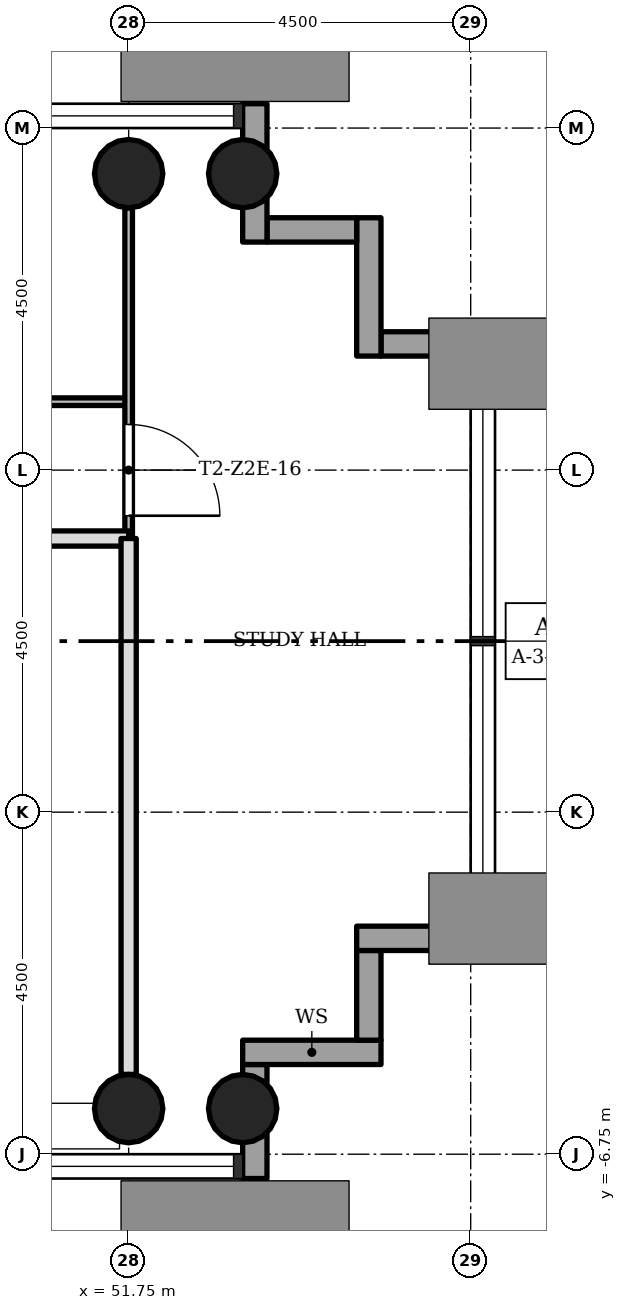
"""IFC4 building model, lengths in metres.
Left out: names, types, materials, properties, quantities, classifications, styles, units other than length and angle.
Written with IfcOpenShell. Run it as: python <this file> out.ifc"""

import sys

from ifc_helpers import new_model, si_unit, direction, frame, frame_2d, origin, origin_2d, place, context, subcontext, project, spatial, rectangle, hollow_circle, extrude, element, fill, save


model = new_model("IFC4")
c1 = context("Model", 3, precision=1e-05, world=origin(), true_north=direction((0.0, 1.0)))
c2 = subcontext(c1, "Body", "Model", "MODEL_VIEW")
j1 = project(units=[si_unit("LENGTHUNIT", "METRE"), si_unit("PLANEANGLEUNIT", "RADIAN")], contexts=[c1])
p1 = place(None, origin())
s1 = spatial("IfcSite", under=j1, at=p1, CompositionType="ELEMENT")
p2 = place(p1, origin())
s2 = spatial("IfcBuilding", under=s1, at=p2, CompositionType="ELEMENT")
p3 = place(p2, frame((0.0, 0.0, 100.4)))
s3 = spatial("IfcBuildingStorey", under=s2, at=p3, CompositionType="ELEMENT", Elevation=100.4)
for number, where, z_axis, x_axis in (
    (1, (51.75, -6.15, 0.0), (0.0, 0.0, 1.0), (1.0, 0.0, 0.0)),
    (2, (51.75, 6.15, 0.0), (0.0, 0.0, 1.0), (1.0, 0.0, 0.0)),
    (3, (53.25, -6.15, 0.0), (0.0, 0.0, 1.0), (1.0, 0.0, 0.0)),
    (4, (53.25, 6.15, 0.0), (0.0, 0.0, 1.0), (1.0, 0.0, 0.0)),
):
    element("IfcColumn", number, at=place(p3, frame(where, z_axis=z_axis, x_axis=x_axis)), inside=s3, PredefinedType="COLUMN", context=c2, shape_type="SweptSolid", body=[
        extrude(hollow_circle(Radius=0.45, WallThickness=0.032, at=origin_2d()), origin(), (0.0, 0.0, 1.0), 3.4),
    ])
p4 = place(p3, frame((53.41, -7.07, -0.3), z_axis=(0.0, 0.0, 1.0), x_axis=(0.0, 1.0, 0.0)))
e5 = element("IfcWall", 5, at=p4, inside=s3, PredefinedType="STANDARD", context=c2, shape_type="SweptSolid", body=[
    extrude(rectangle(XDim=1.5, YDim=0.32, at=frame_2d((0.75, 0.0))), origin(), (0.0, 0.0, 1.0), 3.4),
])
p5 = place(p3, frame((53.25, -5.41, -0.3), z_axis=(0.0, 0.0, 1.0), x_axis=(1.0, 0.0, 0.0)))
e6 = element("IfcWall", 6, at=p5, inside=s3, PredefinedType="STANDARD", context=c2, shape_type="SweptSolid", body=[
    extrude(rectangle(XDim=1.82, YDim=0.32, at=frame_2d((0.91, 0.0))), origin(), (0.0, 0.0, 1.0), 3.4),
])
p6 = place(p3, frame((54.91, -5.25, -0.3), z_axis=(0.0, 0.0, 1.0), x_axis=(0.0, 1.0, 0.0)))
e7 = element("IfcWall", 7, at=p6, inside=s3, PredefinedType="STANDARD", context=c2, shape_type="SweptSolid", body=[
    extrude(rectangle(XDim=1.18, YDim=0.32, at=frame_2d((0.59, 0.0))), origin(), (0.0, 0.0, 1.0), 3.4),
])
p7 = place(p3, frame((54.75, -3.91, -0.3), z_axis=(0.0, 0.0, 1.0), x_axis=(1.0, 0.0, 0.0)))
e8 = element("IfcWall", 8, at=p7, inside=s3, PredefinedType="STANDARD", context=c2, shape_type="SweptSolid", body=[
    extrude(rectangle(XDim=1.82, YDim=0.32, at=frame_2d((0.91, 0.0))), origin(), (0.0, 0.0, 1.0), 3.4),
])
p8 = place(p3, frame((56.57, 3.91, -0.3), z_axis=(0.0, 0.0, 1.0), x_axis=(-1.0, 0.0, 0.0)))
e9 = element("IfcWall", 9, at=p8, inside=s3, PredefinedType="STANDARD", context=c2, shape_type="SweptSolid", body=[
    extrude(rectangle(XDim=1.5, YDim=0.32, at=frame_2d((0.75, 0.0))), origin(), (0.0, 0.0, 1.0), 3.4),
])
p9 = place(p3, frame((54.91, 3.75, -0.3), z_axis=(0.0, 0.0, 1.0), x_axis=(0.0, 1.0, 0.0)))
e10 = element("IfcWall", 10, at=p9, inside=s3, PredefinedType="STANDARD", context=c2, shape_type="SweptSolid", body=[
    extrude(rectangle(XDim=1.82, YDim=0.32, at=frame_2d((0.91, 0.0))), origin(), (0.0, 0.0, 1.0), 3.4),
])
p10 = place(p3, frame((54.75, 5.41, -0.3), z_axis=(0.0, 0.0, 1.0), x_axis=(-1.0, 0.0, 0.0)))
e11 = element("IfcWall", 11, at=p10, inside=s3, PredefinedType="STANDARD", context=c2, shape_type="SweptSolid", body=[
    extrude(rectangle(XDim=1.18, YDim=0.32, at=frame_2d((0.59, 0.0))), origin(), (0.0, 0.0, 1.0), 3.4),
])
p11 = place(p3, frame((53.41, 5.25, -0.3), z_axis=(0.0, 0.0, 1.0), x_axis=(0.0, 1.0, 0.0)))
e12 = element("IfcWall", 12, at=p11, inside=s3, PredefinedType="STANDARD", context=c2, shape_type="SweptSolid", body=[
    extrude(rectangle(XDim=1.82, YDim=0.32, at=frame_2d((0.91, 0.0))), origin(), (0.0, 0.0, 1.0), 3.4),
])
p12 = place(p3, frame((51.75, 1.35, 0.0), z_axis=(0.0, 0.0, 1.0), x_axis=(-1.0, 0.0, 0.0)))
e13 = element("IfcWall", 13, at=p12, inside=s3, PredefinedType="SOLIDWALL", context=c2, shape_type="SweptSolid", body=[
    extrude(rectangle(XDim=7.2, YDim=0.2, at=frame_2d((3.6, 0.0))), origin(), (0.0, 0.0, 1.0), 3.0),
])
p13 = place(p12, frame((1.95, 0.0, 0.0)))
e14 = element("IfcOpeningElement", 14, at=p13, cuts=e13, PredefinedType="OPENING", context=c2, shape_type="SweptSolid", body=[
    extrude(rectangle(XDim=0.9, YDim=2.1, at=frame_2d((0.45, 1.05))), frame((0.0, 0.11, 0.0), z_axis=(0.0, -1.0, 0.0), x_axis=(1.0, 0.0, 0.0)), (0.0, 0.0, 1.0), 0.22),
])
p14 = place(p3, frame((51.75, 3.15, 0.0), z_axis=(0.0, 0.0, 1.0), x_axis=(-1.0, 0.0, 0.0)))
e15 = element("IfcWall", 15, at=p14, inside=s3, PredefinedType="PARTITIONING", context=c2, shape_type="SweptSolid", body=[
    extrude(rectangle(XDim=9.0, YDim=0.1, at=frame_2d((4.5, 0.0))), origin(), (0.0, 0.0, 1.0), 3.0),
])
p15 = place(p14, frame((5.55, 0.0, 0.0)))
e16 = element("IfcOpeningElement", 16, at=p15, cuts=e15, PredefinedType="OPENING", context=c2, shape_type="SweptSolid", body=[
    extrude(rectangle(XDim=0.9, YDim=2.1, at=frame_2d((0.45, 1.05))), frame((0.0, 0.06, 0.0), z_axis=(0.0, -1.0, 0.0), x_axis=(1.0, 0.0, 0.0)), (0.0, 0.0, 1.0), 0.12),
])
p16 = place(p3, frame((51.75, 1.35, 0.0), z_axis=(0.0, 0.0, 1.0), x_axis=(0.0, 1.0, 0.0)))
e17 = element("IfcWall", 17, at=p16, inside=s3, PredefinedType="PARTITIONING", context=c2, shape_type="SweptSolid", body=[
    extrude(rectangle(XDim=4.35, YDim=0.1, at=frame_2d((2.175, 0.0))), origin(), (0.0, 0.0, 1.0), 3.0),
])
p17 = place(p16, frame((0.3, 0.0, 0.0)))
e18 = element("IfcOpeningElement", 18, at=p17, cuts=e17, PredefinedType="OPENING", context=c2, shape_type="SweptSolid", body=[
    extrude(rectangle(XDim=1.2, YDim=2.1, at=frame_2d((0.6, 1.05))), frame((0.0, 0.06, 0.0), z_axis=(0.0, -1.0, 0.0), x_axis=(1.0, 0.0, 0.0)), (0.0, 0.0, 1.0), 0.12),
])
p18 = place(p3, frame((51.75, -5.7, 0.0), z_axis=(0.0, 0.0, 1.0), x_axis=(0.0, 1.0, 0.0)))
e19 = element("IfcWall", 19, at=p18, inside=s3, PredefinedType="SOLIDWALL", context=c2, shape_type="SweptSolid", body=[
    extrude(rectangle(XDim=7.05, YDim=0.2, at=frame_2d((3.525, 0.0))), origin(), (0.0, 0.0, 1.0), 3.0),
])
p19 = place(p17, origin())
e20 = element("IfcDoor", 20, at=p19, inside=s3, OperationType="SINGLE_SWING_LEFT", PredefinedType="DOOR", context=c2, shape_type="SweptSolid", body=[
    extrude(rectangle(XDim=1.2, YDim=2.1, at=frame_2d((0.6, 1.05))), frame((0.0, 0.025, 0.0), z_axis=(0.0, -1.0, 0.0), x_axis=(1.0, 0.0, 0.0)), (0.0, 0.0, 1.0), 0.05),
])
fill(e18, e20)
save(model, sys.argv[1])
